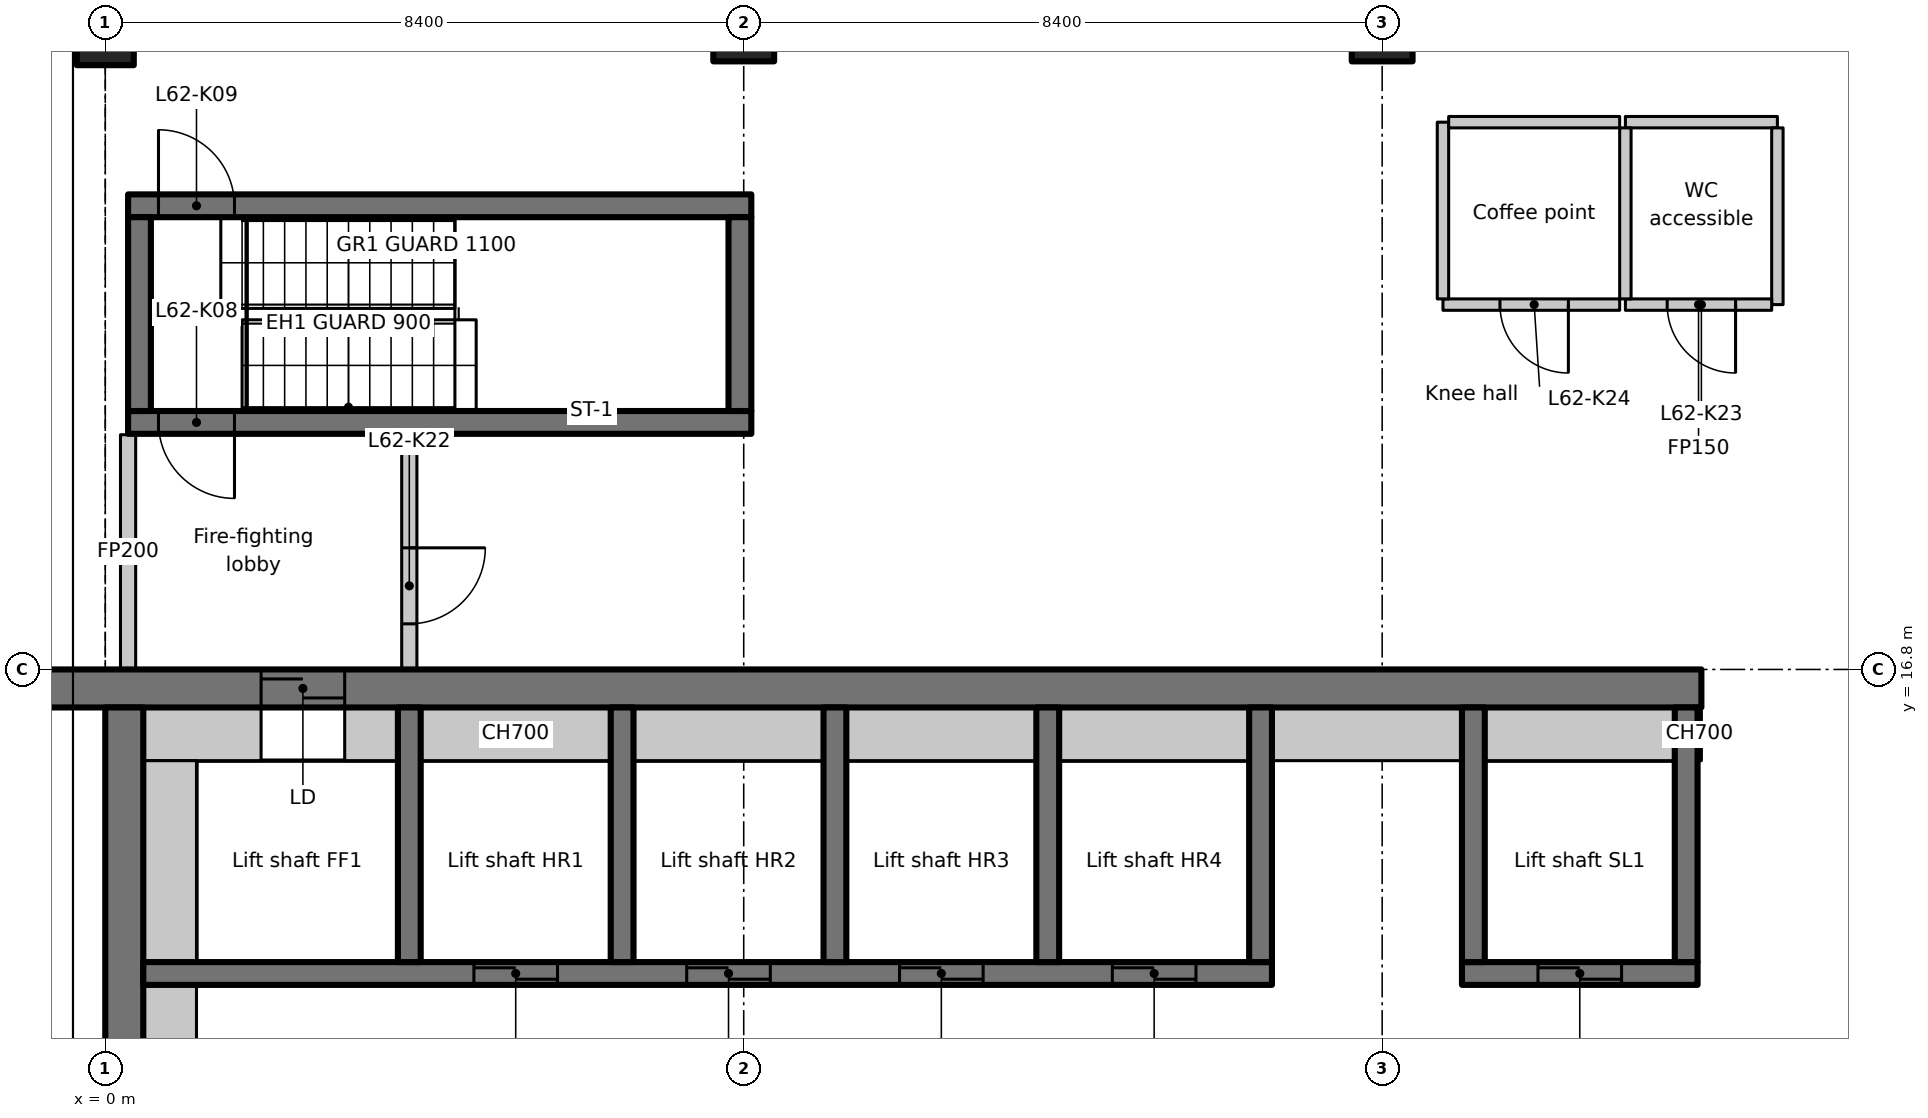
"""IFC4 building model, lengths in metres.
Left out: names, types, materials, properties, quantities, classifications, styles, units other than length and angle.
Written with IfcOpenShell. Run it as: python <this file> out.ifc"""

import sys

from ifc_helpers import new_model, si_unit, direction, frame, frame_2d, origin, origin_2d, place, context, subcontext, project, spatial, rectangle, extrude, element, fill, save


model = new_model("IFC4")
c1 = context("Model", 3, precision=1e-05, world=origin(), true_north=direction((0.0, 1.0)))
c2 = subcontext(c1, "Body", "Model", "MODEL_VIEW")
j1 = project(units=[si_unit("LENGTHUNIT", "METRE"), si_unit("PLANEANGLEUNIT", "RADIAN")], contexts=[c1])
p1 = place(None, origin())
s1 = spatial("IfcSite", under=j1, at=p1, CompositionType="ELEMENT")
p2 = place(p1, origin())
s2 = spatial("IfcBuilding", under=s1, at=p2, CompositionType="ELEMENT")
p3 = place(p2, frame((0.0, 0.0, 244.5)))
s3 = spatial("IfcBuildingStorey", under=s2, at=p3, CompositionType="ELEMENT", Elevation=244.5)
p4 = place(p3, frame((0.0, 25.2, 0.0), z_axis=(0.0, 0.0, 1.0), x_axis=(1.0, 0.0, 0.0)))
e1 = element("IfcColumn", 1, at=p4, inside=s3, PredefinedType="COLUMN", context=c2, shape_type="SweptSolid", body=[
    extrude(rectangle(XDim=0.75, YDim=0.9, at=origin_2d()), origin(), (0.0, 0.0, 1.0), 3.35),
])
for number, where, z_axis, x_axis in (
    (2, (8.4, 25.2, 0.0), (0.0, 0.0, 1.0), (1.0, 0.0, 0.0)),
    (3, (16.8, 25.2, 0.0), (0.0, 0.0, 1.0), (1.0, 0.0, 0.0)),
):
    element("IfcColumn", number, at=place(p3, frame(where, z_axis=z_axis, x_axis=x_axis)), inside=s3, PredefinedType="COLUMN", context=c2, shape_type="SweptSolid", body=[
        extrude(rectangle(XDim=0.8, YDim=0.8, at=origin_2d()), origin(), (0.0, 0.0, 1.0), 3.35),
    ])
p5 = place(p3, frame((-1.1, 16.55, 0.0), z_axis=(0.0, 0.0, 1.0), x_axis=(1.0, 0.0, 0.0)))
e4 = element("IfcWall", 4, at=p5, inside=s3, PredefinedType="SHEAR", context=c2, shape_type="SweptSolid", body=[
    extrude(rectangle(XDim=22.1, YDim=0.5, at=frame_2d((11.05, 0.0))), origin(), (0.0, 0.0, 1.0), 3.35),
])
p6 = place(p5, frame((3.15, 0.0, 0.0)))
e5 = element("IfcOpeningElement", 5, at=p6, cuts=e4, PredefinedType="OPENING", context=c2, shape_type="SweptSolid", body=[
    extrude(rectangle(XDim=1.1, YDim=2.3, at=frame_2d((0.55, 1.15))), frame((0.0, 0.26, 0.0), z_axis=(0.0, -1.0, 0.0), x_axis=(1.0, 0.0, 0.0)), (0.0, 0.0, 1.0), 0.52),
])
p7 = place(p3, frame((0.25, 7.436, 0.0), z_axis=(0.0, 0.0, 1.0), x_axis=(0.0, 1.0, 0.0)))
e6 = element("IfcWall", 6, at=p7, inside=s3, PredefinedType="SHEAR", context=c2, shape_type="SweptSolid", body=[
    extrude(rectangle(XDim=8.864, YDim=0.5, at=frame_2d((4.432, 0.0))), origin(), (0.0, 0.0, 1.0), 3.35),
])
p8 = place(p3, frame((0.5, 15.95, 0.0), z_axis=(0.0, 0.0, 1.0), x_axis=(1.0, 0.0, 0.0)))
e7 = element("IfcWall", 7, at=p8, inside=s3, PredefinedType="PARTITIONING", context=c2, shape_type="SweptSolid", body=[
    extrude(rectangle(XDim=1.55, YDim=0.7, at=frame_2d((0.775, 0.0))), origin(), (0.0, 0.0, 1.0), 3.35),
])
p9 = place(p3, frame((0.5, 12.8, 0.0), z_axis=(0.0, 0.0, 1.0), x_axis=(1.0, 0.0, 0.0)))
e8 = element("IfcWall", 8, at=p9, inside=s3, PredefinedType="SHEAR", context=c2, shape_type="SweptSolid", body=[
    extrude(rectangle(XDim=14.85, YDim=0.3, at=frame_2d((7.425, 0.0))), origin(), (0.0, 0.0, 1.0), 3.35),
])
p10 = place(p9, frame((4.35, 0.0, 0.0)))
e9 = element("IfcOpeningElement", 9, at=p10, cuts=e8, PredefinedType="OPENING", context=c2, shape_type="SweptSolid", body=[
    extrude(rectangle(XDim=1.1, YDim=2.3, at=frame_2d((0.55, 1.15))), frame((0.0, 0.16, 0.0), z_axis=(0.0, -1.0, 0.0), x_axis=(1.0, 0.0, 0.0)), (0.0, 0.0, 1.0), 0.32),
])
p11 = place(p9, frame((7.15, 0.0, 0.0)))
e10 = element("IfcOpeningElement", 10, at=p11, cuts=e8, PredefinedType="OPENING", context=c2, shape_type="SweptSolid", body=[
    extrude(rectangle(XDim=1.1, YDim=2.3, at=frame_2d((0.55, 1.15))), frame((0.0, 0.16, 0.0), z_axis=(0.0, -1.0, 0.0), x_axis=(1.0, 0.0, 0.0)), (0.0, 0.0, 1.0), 0.32),
])
p12 = place(p9, frame((9.95, 0.0, 0.0)))
e11 = element("IfcOpeningElement", 11, at=p12, cuts=e8, PredefinedType="OPENING", context=c2, shape_type="SweptSolid", body=[
    extrude(rectangle(XDim=1.1, YDim=2.3, at=frame_2d((0.55, 1.15))), frame((0.0, 0.16, 0.0), z_axis=(0.0, -1.0, 0.0), x_axis=(1.0, 0.0, 0.0)), (0.0, 0.0, 1.0), 0.32),
])
p13 = place(p9, frame((12.75, 0.0, 0.0)))
e12 = element("IfcOpeningElement", 12, at=p13, cuts=e8, PredefinedType="OPENING", context=c2, shape_type="SweptSolid", body=[
    extrude(rectangle(XDim=1.1, YDim=2.3, at=frame_2d((0.55, 1.15))), frame((0.0, 0.16, 0.0), z_axis=(0.0, -1.0, 0.0), x_axis=(1.0, 0.0, 0.0)), (0.0, 0.0, 1.0), 0.32),
])
for number, where, z_axis, x_axis in (
    (13, (4.0, 12.95, 0.0), (0.0, 0.0, 1.0), (0.0, 1.0, 0.0)),
    (14, (6.8, 12.95, 0.0), (0.0, 0.0, 1.0), (0.0, 1.0, 0.0)),
    (15, (9.6, 12.95, 0.0), (0.0, 0.0, 1.0), (0.0, 1.0, 0.0)),
    (16, (12.4, 12.95, 0.0), (0.0, 0.0, 1.0), (0.0, 1.0, 0.0)),
    (17, (15.2, 12.95, 0.0), (0.0, 0.0, 1.0), (0.0, 1.0, 0.0)),
):
    element("IfcWall", number, at=place(p3, frame(where, z_axis=z_axis, x_axis=x_axis)), inside=s3, PredefinedType="SHEAR", context=c2, shape_type="SweptSolid", body=[
        extrude(rectangle(XDim=3.35, YDim=0.3, at=frame_2d((1.675, 0.0))), origin(), (0.0, 0.0, 1.0), 3.35),
    ])
p14 = place(p3, frame((17.85, 12.8, 0.0), z_axis=(0.0, 0.0, 1.0), x_axis=(1.0, 0.0, 0.0)))
e18 = element("IfcWall", 18, at=p14, inside=s3, PredefinedType="SHEAR", context=c2, shape_type="SweptSolid", body=[
    extrude(rectangle(XDim=3.1, YDim=0.3, at=frame_2d((1.55, 0.0))), origin(), (0.0, 0.0, 1.0), 3.35),
])
p15 = place(p14, frame((1.0, 0.0, 0.0)))
e19 = element("IfcOpeningElement", 19, at=p15, cuts=e18, PredefinedType="OPENING", context=c2, shape_type="SweptSolid", body=[
    extrude(rectangle(XDim=1.1, YDim=2.3, at=frame_2d((0.55, 1.15))), frame((0.0, 0.16, 0.0), z_axis=(0.0, -1.0, 0.0), x_axis=(1.0, 0.0, 0.0)), (0.0, 0.0, 1.0), 0.32),
])
for number, where, z_axis, x_axis in (
    (20, (18.0, 12.95, 0.0), (0.0, 0.0, 1.0), (0.0, 1.0, 0.0)),
    (21, (20.8, 12.95, 0.0), (0.0, 0.0, 1.0), (0.0, 1.0, 0.0)),
):
    element("IfcWall", number, at=place(p3, frame(where, z_axis=z_axis, x_axis=x_axis)), inside=s3, PredefinedType="SHEAR", context=c2, shape_type="SweptSolid", body=[
        extrude(rectangle(XDim=3.35, YDim=0.3, at=frame_2d((1.675, 0.0))), origin(), (0.0, 0.0, 1.0), 3.35),
    ])
p16 = place(p3, frame((8.5, 20.05, 0.0), z_axis=(0.0, 0.0, 1.0), x_axis=(-1.0, 0.0, 0.0)))
e22 = element("IfcWall", 22, at=p16, inside=s3, PredefinedType="SHEAR", context=c2, shape_type="SweptSolid", body=[
    extrude(rectangle(XDim=8.2, YDim=0.3, at=frame_2d((4.1, 0.0))), origin(), (0.0, 0.0, 1.0), 3.35),
])
p17 = place(p16, frame((6.8, 0.0, 0.0)))
e23 = element("IfcOpeningElement", 23, at=p17, cuts=e22, PredefinedType="OPENING", context=c2, shape_type="SweptSolid", body=[
    extrude(rectangle(XDim=1.0, YDim=2.1, at=frame_2d((0.5, 1.05))), frame((0.0, 0.16, 0.0), z_axis=(0.0, -1.0, 0.0), x_axis=(1.0, 0.0, 0.0)), (0.0, 0.0, 1.0), 0.32),
])
p18 = place(p3, frame((0.3, 22.9, 0.0), z_axis=(0.0, 0.0, 1.0), x_axis=(1.0, 0.0, 0.0)))
e24 = element("IfcWall", 24, at=p18, inside=s3, PredefinedType="SHEAR", context=c2, shape_type="SweptSolid", body=[
    extrude(rectangle(XDim=8.2, YDim=0.3, at=frame_2d((4.1, 0.0))), origin(), (0.0, 0.0, 1.0), 3.35),
])
p19 = place(p18, frame((0.4, 0.0, 0.0)))
e25 = element("IfcOpeningElement", 25, at=p19, cuts=e24, PredefinedType="OPENING", context=c2, shape_type="SweptSolid", body=[
    extrude(rectangle(XDim=1.0, YDim=2.1, at=frame_2d((0.5, 1.05))), frame((0.0, 0.16, 0.0), z_axis=(0.0, -1.0, 0.0), x_axis=(1.0, 0.0, 0.0)), (0.0, 0.0, 1.0), 0.32),
])
for number, where, z_axis, x_axis in (
    (26, (0.45, 20.2, 0.0), (0.0, 0.0, 1.0), (0.0, 1.0, 0.0)),
    (27, (8.35, 20.2, 0.0), (0.0, 0.0, 1.0), (0.0, 1.0, 0.0)),
):
    element("IfcWall", number, at=place(p3, frame(where, z_axis=z_axis, x_axis=x_axis)), inside=s3, PredefinedType="SHEAR", context=c2, shape_type="SweptSolid", body=[
        extrude(rectangle(XDim=2.55, YDim=0.3, at=frame_2d((1.275, 0.0))), origin(), (0.0, 0.0, 1.0), 3.35),
    ])
p20 = place(p3, frame((0.3, 16.812, 0.0), z_axis=(0.0, 0.0, 1.0), x_axis=(0.0, 1.0, 0.0)))
e28 = element("IfcWall", 28, at=p20, inside=s3, PredefinedType="PARTITIONING", context=c2, shape_type="SweptSolid", body=[
    extrude(rectangle(XDim=3.076, YDim=0.2, at=frame_2d((1.538, 0.0))), origin(), (0.0, 0.0, 1.0), 2.98),
])
p21 = place(p3, frame((4.0, 19.888, 0.0), z_axis=(0.0, 0.0, 1.0), x_axis=(0.0, -1.0, 0.0)))
e29 = element("IfcWall", 29, at=p21, inside=s3, PredefinedType="PARTITIONING", context=c2, shape_type="SweptSolid", body=[
    extrude(rectangle(XDim=3.076, YDim=0.2, at=frame_2d((1.538, 0.0))), origin(), (0.0, 0.0, 1.0), 3.35),
])
p22 = place(p21, frame((1.488, 0.0, 0.0)))
e30 = element("IfcOpeningElement", 30, at=p22, cuts=e29, PredefinedType="OPENING", context=c2, shape_type="SweptSolid", body=[
    extrude(rectangle(XDim=1.0, YDim=2.1, at=frame_2d((0.5, 1.05))), frame((0.0, 0.11, 0.0), z_axis=(0.0, -1.0, 0.0), x_axis=(1.0, 0.0, 0.0)), (0.0, 0.0, 1.0), 0.22),
])
p23 = place(p3, frame((20.0, 24.0, 0.0), z_axis=(0.0, 0.0, 1.0), x_axis=(1.0, 0.0, 0.0)))
e31 = element("IfcWall", 31, at=p23, inside=s3, PredefinedType="PARTITIONING", context=c2, shape_type="SweptSolid", body=[
    extrude(rectangle(XDim=2.0, YDim=0.15, at=frame_2d((1.0, 0.0))), origin(), (0.0, 0.0, 1.0), 3.35),
])
p24 = place(p3, frame((22.0, 23.925, 0.0), z_axis=(0.0, 0.0, 1.0), x_axis=(0.0, -1.0, 0.0)))
e32 = element("IfcWall", 32, at=p24, inside=s3, PredefinedType="PARTITIONING", context=c2, shape_type="SweptSolid", body=[
    extrude(rectangle(XDim=2.325, YDim=0.15, at=frame_2d((1.163, 0.0))), origin(), (0.0, 0.0, 1.0), 3.35),
])
p25 = place(p3, frame((21.925, 21.6, 0.0), z_axis=(0.0, 0.0, 1.0), x_axis=(-1.0, 0.0, 0.0)))
e33 = element("IfcWall", 33, at=p25, inside=s3, PredefinedType="PARTITIONING", context=c2, shape_type="SweptSolid", body=[
    extrude(rectangle(XDim=1.925, YDim=0.15, at=frame_2d((0.962, 0.0))), origin(), (0.0, 0.0, 1.0), 3.35),
])
p26 = place(p25, frame((0.475, 0.0, 0.0)))
e34 = element("IfcOpeningElement", 34, at=p26, cuts=e33, PredefinedType="OPENING", context=c2, shape_type="SweptSolid", body=[
    extrude(rectangle(XDim=0.9, YDim=2.1, at=frame_2d((0.45, 1.05))), frame((0.0, 0.085, 0.0), z_axis=(0.0, -1.0, 0.0), x_axis=(1.0, 0.0, 0.0)), (0.0, 0.0, 1.0), 0.17),
])
p27 = place(p3, frame((20.0, 21.675, 0.0), z_axis=(0.0, 0.0, 1.0), x_axis=(0.0, 1.0, 0.0)))
e35 = element("IfcWall", 35, at=p27, inside=s3, PredefinedType="PARTITIONING", context=c2, shape_type="SweptSolid", body=[
    extrude(rectangle(XDim=2.25, YDim=0.15, at=frame_2d((1.125, 0.0))), origin(), (0.0, 0.0, 1.0), 3.35),
])
p28 = place(p3, frame((19.925, 21.6, 0.0), z_axis=(0.0, 0.0, 1.0), x_axis=(-1.0, 0.0, 0.0)))
e36 = element("IfcWall", 36, at=p28, inside=s3, PredefinedType="PARTITIONING", context=c2, shape_type="SweptSolid", body=[
    extrude(rectangle(XDim=2.325, YDim=0.15, at=frame_2d((1.163, 0.0))), origin(), (0.0, 0.0, 1.0), 3.35),
])
p29 = place(p28, frame((0.675, 0.0, 0.0)))
e37 = element("IfcOpeningElement", 37, at=p29, cuts=e36, PredefinedType="OPENING", context=c2, shape_type="SweptSolid", body=[
    extrude(rectangle(XDim=0.9, YDim=2.1, at=frame_2d((0.45, 1.05))), frame((0.0, 0.085, 0.0), z_axis=(0.0, -1.0, 0.0), x_axis=(1.0, 0.0, 0.0)), (0.0, 0.0, 1.0), 0.17),
])
p30 = place(p3, frame((17.6, 21.675, 0.0), z_axis=(0.0, 0.0, 1.0), x_axis=(0.0, 1.0, 0.0)))
e38 = element("IfcWall", 38, at=p30, inside=s3, PredefinedType="PARTITIONING", context=c2, shape_type="SweptSolid", body=[
    extrude(rectangle(XDim=2.325, YDim=0.15, at=frame_2d((1.163, 0.0))), origin(), (0.0, 0.0, 1.0), 3.35),
])
p31 = place(p3, frame((17.675, 24.0, 0.0), z_axis=(0.0, 0.0, 1.0), x_axis=(1.0, 0.0, 0.0)))
e39 = element("IfcWall", 39, at=p31, inside=s3, PredefinedType="PARTITIONING", context=c2, shape_type="SweptSolid", body=[
    extrude(rectangle(XDim=2.25, YDim=0.15, at=frame_2d((1.125, 0.0))), origin(), (0.0, 0.0, 1.0), 3.35),
])
p32 = place(p3, frame((0.85, 7.436, 0.0), z_axis=(0.0, 0.0, 1.0), x_axis=(0.0, 1.0, 0.0)))
e40 = element("IfcWall", 40, at=p32, inside=s3, PredefinedType="PARTITIONING", context=c2, shape_type="SweptSolid", body=[
    extrude(rectangle(XDim=5.214, YDim=0.7, at=frame_2d((2.607, 0.0))), origin(), (0.0, 0.0, 1.0), 3.35),
])
p33 = place(p3, frame((0.85, 12.95, 0.0), z_axis=(0.0, 0.0, 1.0), x_axis=(0.0, 1.0, 0.0)))
e41 = element("IfcWall", 41, at=p33, inside=s3, PredefinedType="PARTITIONING", context=c2, shape_type="SweptSolid", body=[
    extrude(rectangle(XDim=2.65, YDim=0.7, at=frame_2d((1.325, 0.0))), origin(), (0.0, 0.0, 1.0), 3.35),
])
p34 = place(p3, frame((3.15, 15.95, 0.0), z_axis=(0.0, 0.0, 1.0), x_axis=(1.0, 0.0, 0.0)))
e42 = element("IfcWall", 42, at=p34, inside=s3, PredefinedType="PARTITIONING", context=c2, shape_type="SweptSolid", body=[
    extrude(rectangle(XDim=0.7, YDim=0.7, at=frame_2d((0.35, 0.0))), origin(), (0.0, 0.0, 1.0), 3.35),
])
for number, where, z_axis, x_axis in (
    (43, (4.15, 15.95, 0.0), (0.0, 0.0, 1.0), (1.0, 0.0, 0.0)),
    (44, (6.95, 15.95, 0.0), (0.0, 0.0, 1.0), (1.0, 0.0, 0.0)),
    (45, (9.75, 15.95, 0.0), (0.0, 0.0, 1.0), (1.0, 0.0, 0.0)),
    (46, (12.55, 15.95, 0.0), (0.0, 0.0, 1.0), (1.0, 0.0, 0.0)),
    (47, (15.35, 15.95, 0.0), (0.0, 0.0, 1.0), (1.0, 0.0, 0.0)),
    (48, (18.15, 15.95, 0.0), (0.0, 0.0, 1.0), (1.0, 0.0, 0.0)),
):
    element("IfcWall", number, at=place(p3, frame(where, z_axis=z_axis, x_axis=x_axis)), inside=s3, PredefinedType="PARTITIONING", context=c2, shape_type="SweptSolid", body=[
        extrude(rectangle(XDim=2.5, YDim=0.7, at=frame_2d((1.25, 0.0))), origin(), (0.0, 0.0, 1.0), 3.35),
    ])
p35 = place(p3, frame((20.95, 15.95, 0.0), z_axis=(0.0, 0.0, 1.0), x_axis=(1.0, 0.0, 0.0)))
e49 = element("IfcWall", 49, at=p35, inside=s3, PredefinedType="PARTITIONING", context=c2, shape_type="SweptSolid", body=[
    extrude(rectangle(XDim=0.05, YDim=0.7, at=frame_2d((0.025, 0.0))), origin(), (0.0, 0.0, 1.0), 3.35),
])
p36 = place(p6, origin())
e50 = element("IfcDoor", 50, at=p36, inside=s3, OperationType="SLIDING_TO_LEFT", PredefinedType="DOOR", context=c2, shape_type="SweptSolid", body=[
    extrude(rectangle(XDim=1.1, YDim=2.3, at=frame_2d((0.55, 1.15))), frame((0.0, 0.025, 0.0), z_axis=(0.0, -1.0, 0.0), x_axis=(1.0, 0.0, 0.0)), (0.0, 0.0, 1.0), 0.05),
])
fill(e5, e50)
p37 = place(p10, origin())
e51 = element("IfcDoor", 51, at=p37, inside=s3, OperationType="SLIDING_TO_LEFT", PredefinedType="DOOR", context=c2, shape_type="SweptSolid", body=[
    extrude(rectangle(XDim=1.1, YDim=2.3, at=frame_2d((0.55, 1.15))), frame((0.0, 0.025, 0.0), z_axis=(0.0, -1.0, 0.0), x_axis=(1.0, 0.0, 0.0)), (0.0, 0.0, 1.0), 0.05),
])
fill(e9, e51)
p38 = place(p11, origin())
e52 = element("IfcDoor", 52, at=p38, inside=s3, OperationType="SLIDING_TO_LEFT", PredefinedType="DOOR", context=c2, shape_type="SweptSolid", body=[
    extrude(rectangle(XDim=1.1, YDim=2.3, at=frame_2d((0.55, 1.15))), frame((0.0, 0.025, 0.0), z_axis=(0.0, -1.0, 0.0), x_axis=(1.0, 0.0, 0.0)), (0.0, 0.0, 1.0), 0.05),
])
fill(e10, e52)
p39 = place(p12, origin())
e53 = element("IfcDoor", 53, at=p39, inside=s3, OperationType="SLIDING_TO_LEFT", PredefinedType="DOOR", context=c2, shape_type="SweptSolid", body=[
    extrude(rectangle(XDim=1.1, YDim=2.3, at=frame_2d((0.55, 1.15))), frame((0.0, 0.025, 0.0), z_axis=(0.0, -1.0, 0.0), x_axis=(1.0, 0.0, 0.0)), (0.0, 0.0, 1.0), 0.05),
])
fill(e11, e53)
p40 = place(p13, origin())
e54 = element("IfcDoor", 54, at=p40, inside=s3, OperationType="SLIDING_TO_LEFT", PredefinedType="DOOR", context=c2, shape_type="SweptSolid", body=[
    extrude(rectangle(XDim=1.1, YDim=2.3, at=frame_2d((0.55, 1.15))), frame((0.0, 0.025, 0.0), z_axis=(0.0, -1.0, 0.0), x_axis=(1.0, 0.0, 0.0)), (0.0, 0.0, 1.0), 0.05),
])
fill(e12, e54)
p41 = place(p15, origin())
e55 = element("IfcDoor", 55, at=p41, inside=s3, OperationType="SLIDING_TO_LEFT", PredefinedType="DOOR", context=c2, shape_type="SweptSolid", body=[
    extrude(rectangle(XDim=1.1, YDim=2.3, at=frame_2d((0.55, 1.15))), frame((0.0, 0.025, 0.0), z_axis=(0.0, -1.0, 0.0), x_axis=(1.0, 0.0, 0.0)), (0.0, 0.0, 1.0), 0.05),
])
fill(e19, e55)
p42 = place(p17, origin())
e56 = element("IfcDoor", 56, at=p42, inside=s3, OperationType="SINGLE_SWING_RIGHT", PredefinedType="DOOR", context=c2, shape_type="SweptSolid", body=[
    extrude(rectangle(XDim=1.0, YDim=2.1, at=frame_2d((0.5, 1.05))), frame((0.0, 0.025, 0.0), z_axis=(0.0, -1.0, 0.0), x_axis=(1.0, 0.0, 0.0)), (0.0, 0.0, 1.0), 0.05),
])
fill(e23, e56)
p43 = place(p19, origin())
e57 = element("IfcDoor", 57, at=p43, inside=s3, OperationType="SINGLE_SWING_LEFT", PredefinedType="DOOR", context=c2, shape_type="SweptSolid", body=[
    extrude(rectangle(XDim=1.0, YDim=2.1, at=frame_2d((0.5, 1.05))), frame((0.0, 0.025, 0.0), z_axis=(0.0, -1.0, 0.0), x_axis=(1.0, 0.0, 0.0)), (0.0, 0.0, 1.0), 0.05),
])
fill(e25, e57)
p44 = place(p22, origin())
e58 = element("IfcDoor", 58, at=p44, inside=s3, OperationType="SINGLE_SWING_RIGHT", PredefinedType="DOOR", context=c2, shape_type="SweptSolid", body=[
    extrude(rectangle(XDim=1.0, YDim=2.1, at=frame_2d((0.5, 1.05))), frame((0.0, 0.025, 0.0), z_axis=(0.0, -1.0, 0.0), x_axis=(1.0, 0.0, 0.0)), (0.0, 0.0, 1.0), 0.05),
])
fill(e30, e58)
p45 = place(p26, origin())
e59 = element("IfcDoor", 59, at=p45, inside=s3, OperationType="SINGLE_SWING_LEFT", PredefinedType="DOOR", context=c2, shape_type="SweptSolid", body=[
    extrude(rectangle(XDim=0.9, YDim=2.1, at=frame_2d((0.45, 1.05))), frame((0.0, 0.025, 0.0), z_axis=(0.0, -1.0, 0.0), x_axis=(1.0, 0.0, 0.0)), (0.0, 0.0, 1.0), 0.05),
])
fill(e34, e59)
p46 = place(p29, origin())
e60 = element("IfcDoor", 60, at=p46, inside=s3, OperationType="SINGLE_SWING_RIGHT", PredefinedType="DOOR", context=c2, shape_type="SweptSolid", body=[
    extrude(rectangle(XDim=0.9, YDim=2.1, at=frame_2d((0.45, 1.05))), frame((0.0, 0.025, 0.0), z_axis=(0.0, -1.0, 0.0), x_axis=(1.0, 0.0, 0.0)), (0.0, 0.0, 1.0), 0.05),
])
fill(e37, e60)
save(model, sys.argv[1])
